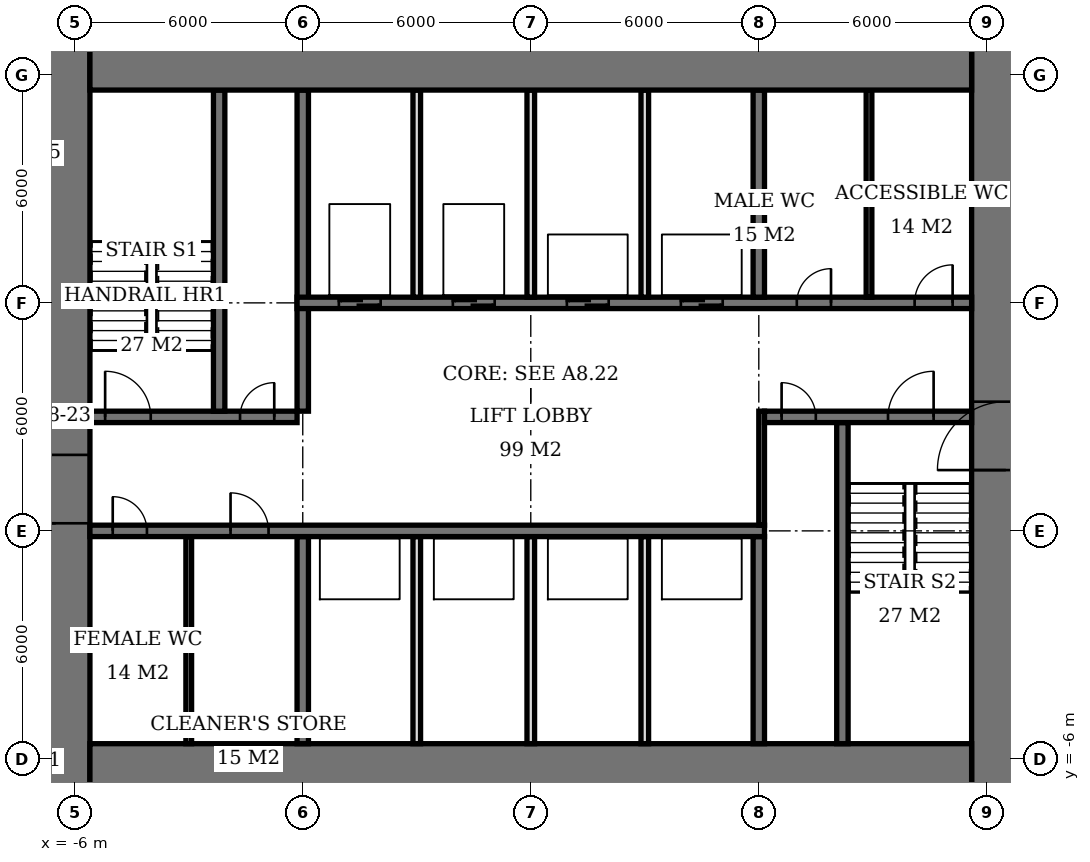
"""IFC4 building model, lengths in metres.
Left out: names, types, materials, properties, quantities, classifications, styles, units other than length and angle.
Written with IfcOpenShell. Run it as: python <this file> out.ifc"""

import sys

from ifc_helpers import new_model, si_unit, direction, frame, frame_2d, origin, place, context, subcontext, project, spatial, rectangle, extrude, element, fill, save


model = new_model("IFC4")
c1 = context("Model", 3, precision=1e-05, world=origin(), true_north=direction((0.0, 1.0)))
c2 = subcontext(c1, "Body", "Model", "MODEL_VIEW")
j1 = project(units=[si_unit("LENGTHUNIT", "METRE"), si_unit("PLANEANGLEUNIT", "RADIAN")], contexts=[c1])
p1 = place(None, origin())
s1 = spatial("IfcSite", under=j1, at=p1, CompositionType="ELEMENT")
p2 = place(p1, origin())
s2 = spatial("IfcBuilding", under=s1, at=p2, CompositionType="ELEMENT")
p3 = place(p2, frame((0.0, 0.0, 37.7)))
s3 = spatial("IfcBuildingStorey", under=s2, at=p3, CompositionType="ELEMENT", Elevation=37.7)
for number, where, z_axis, x_axis in (
    (1, (-5.6, -6.6, 0.0), (0.0, 0.0, 1.0), (1.0, 0.0, 0.0)),
    (2, (-5.6, 12.6, 0.0), (0.0, 0.0, 1.0), (1.0, 0.0, 0.0)),
):
    element("IfcWall", number, at=place(p3, frame(where, z_axis=z_axis, x_axis=x_axis)), inside=s3, PredefinedType="SHEAR", context=c2, shape_type="SweptSolid", body=[
        extrude(rectangle(XDim=23.2, YDim=2.0, at=frame_2d((11.6, 0.0))), origin(), (0.0, 0.0, 1.0), 3.9),
    ])
p4 = place(p3, frame((-6.5, -7.6, 0.0), z_axis=(0.0, 0.0, 1.0), x_axis=(0.0, 1.0, 0.0)))
e3 = element("IfcWall", 3, at=p4, inside=s3, PredefinedType="SHEAR", context=c2, shape_type="SweptSolid", body=[
    extrude(rectangle(XDim=21.2, YDim=1.8, at=frame_2d((10.6, 0.0))), origin(), (0.0, 0.0, 1.0), 3.9),
])
p5 = place(p4, frame((7.8, 0.0, 0.0)))
e4 = element("IfcOpeningElement", 4, at=p5, cuts=e3, PredefinedType="OPENING", context=c2, shape_type="SweptSolid", body=[
    extrude(rectangle(XDim=1.8, YDim=2.4, at=frame_2d((0.9, 1.2))), frame((0.0, 0.91, 0.0), z_axis=(0.0, -1.0, 0.0), x_axis=(1.0, 0.0, 0.0)), (0.0, 0.0, 1.0), 1.82),
])
p6 = place(p3, frame((18.5, -7.6, 0.0), z_axis=(0.0, 0.0, 1.0), x_axis=(0.0, 1.0, 0.0)))
e5 = element("IfcWall", 5, at=p6, inside=s3, PredefinedType="SHEAR", context=c2, shape_type="SweptSolid", body=[
    extrude(rectangle(XDim=21.2, YDim=1.8, at=frame_2d((10.6, 0.0))), origin(), (0.0, 0.0, 1.0), 3.9),
])
p7 = place(p6, frame((9.2, 0.0, 0.0)))
e6 = element("IfcOpeningElement", 6, at=p7, cuts=e5, PredefinedType="OPENING", context=c2, shape_type="SweptSolid", body=[
    extrude(rectangle(XDim=1.8, YDim=2.4, at=frame_2d((0.9, 1.2))), frame((0.0, 0.91, 0.0), z_axis=(0.0, -1.0, 0.0), x_axis=(1.0, 0.0, 0.0)), (0.0, 0.0, 1.0), 1.82),
])
p8 = place(p3, frame((-5.6, 0.0, 0.0), z_axis=(0.0, 0.0, 1.0), x_axis=(1.0, 0.0, 0.0)))
e7 = element("IfcWall", 7, at=p8, inside=s3, PredefinedType="SHEAR", context=c2, shape_type="SweptSolid", body=[
    extrude(rectangle(XDim=17.75, YDim=0.3, at=frame_2d((8.875, 0.0))), origin(), (0.0, 0.0, 1.0), 3.9),
])
p9 = place(p8, frame((0.6, 0.0, 0.0)))
e8 = element("IfcOpeningElement", 8, at=p9, cuts=e7, PredefinedType="OPENING", context=c2, shape_type="SweptSolid", body=[
    extrude(rectangle(XDim=0.9, YDim=2.1, at=frame_2d((0.45, 1.05))), frame((0.0, 0.16, 0.0), z_axis=(0.0, -1.0, 0.0), x_axis=(1.0, 0.0, 0.0)), (0.0, 0.0, 1.0), 0.32),
])
p10 = place(p8, frame((3.7, 0.0, 0.0)))
e9 = element("IfcOpeningElement", 9, at=p10, cuts=e7, PredefinedType="OPENING", context=c2, shape_type="SweptSolid", body=[
    extrude(rectangle(XDim=1.0, YDim=2.1, at=frame_2d((0.5, 1.05))), frame((0.0, 0.16, 0.0), z_axis=(0.0, -1.0, 0.0), x_axis=(1.0, 0.0, 0.0)), (0.0, 0.0, 1.0), 0.32),
])
p11 = place(p3, frame((-5.6, 3.0, 0.0), z_axis=(0.0, 0.0, 1.0), x_axis=(1.0, 0.0, 0.0)))
e10 = element("IfcWall", 10, at=p11, inside=s3, PredefinedType="SHEAR", context=c2, shape_type="SweptSolid", body=[
    extrude(rectangle(XDim=5.45, YDim=0.3, at=frame_2d((2.725, 0.0))), origin(), (0.0, 0.0, 1.0), 3.9),
])
p12 = place(p11, frame((0.4, 0.0, 0.0)))
e11 = element("IfcOpeningElement", 11, at=p12, cuts=e10, PredefinedType="OPENING", context=c2, shape_type="SweptSolid", body=[
    extrude(rectangle(XDim=1.2, YDim=2.1, at=frame_2d((0.6, 1.05))), frame((0.0, 0.16, 0.0), z_axis=(0.0, -1.0, 0.0), x_axis=(1.0, 0.0, 0.0)), (0.0, 0.0, 1.0), 0.32),
])
p13 = place(p11, frame((3.95, 0.0, 0.0)))
e12 = element("IfcOpeningElement", 12, at=p13, cuts=e10, PredefinedType="OPENING", context=c2, shape_type="SweptSolid", body=[
    extrude(rectangle(XDim=0.9, YDim=2.1, at=frame_2d((0.45, 1.05))), frame((0.0, 0.16, 0.0), z_axis=(0.0, -1.0, 0.0), x_axis=(1.0, 0.0, 0.0)), (0.0, 0.0, 1.0), 0.32),
])
p14 = place(p3, frame((12.15, 3.0, 0.0), z_axis=(0.0, 0.0, 1.0), x_axis=(1.0, 0.0, 0.0)))
e13 = element("IfcWall", 13, at=p14, inside=s3, PredefinedType="SHEAR", context=c2, shape_type="SweptSolid", body=[
    extrude(rectangle(XDim=5.45, YDim=0.3, at=frame_2d((2.725, 0.0))), origin(), (0.0, 0.0, 1.0), 3.9),
])
p15 = place(p14, frame((3.25, 0.0, 0.0)))
e14 = element("IfcOpeningElement", 14, at=p15, cuts=e13, PredefinedType="OPENING", context=c2, shape_type="SweptSolid", body=[
    extrude(rectangle(XDim=1.2, YDim=2.1, at=frame_2d((0.6, 1.05))), frame((0.0, 0.16, 0.0), z_axis=(0.0, -1.0, 0.0), x_axis=(1.0, 0.0, 0.0)), (0.0, 0.0, 1.0), 0.32),
])
p16 = place(p14, frame((0.45, 0.0, 0.0)))
e15 = element("IfcOpeningElement", 15, at=p16, cuts=e13, PredefinedType="OPENING", context=c2, shape_type="SweptSolid", body=[
    extrude(rectangle(XDim=0.9, YDim=2.1, at=frame_2d((0.45, 1.05))), frame((0.0, 0.16, 0.0), z_axis=(0.0, -1.0, 0.0), x_axis=(1.0, 0.0, 0.0)), (0.0, 0.0, 1.0), 0.32),
])
p17 = place(p3, frame((-0.15, 6.0, 0.0), z_axis=(0.0, 0.0, 1.0), x_axis=(1.0, 0.0, 0.0)))
e16 = element("IfcWall", 16, at=p17, inside=s3, PredefinedType="SHEAR", context=c2, shape_type="SweptSolid", body=[
    extrude(rectangle(XDim=17.75, YDim=0.3, at=frame_2d((8.875, 0.0))), origin(), (0.0, 0.0, 1.0), 3.9),
])
p18 = place(p17, frame((13.15, 0.0, 0.0)))
e17 = element("IfcOpeningElement", 17, at=p18, cuts=e16, PredefinedType="OPENING", context=c2, shape_type="SweptSolid", body=[
    extrude(rectangle(XDim=0.9, YDim=2.1, at=frame_2d((0.45, 1.05))), frame((0.0, 0.16, 0.0), z_axis=(0.0, -1.0, 0.0), x_axis=(1.0, 0.0, 0.0)), (0.0, 0.0, 1.0), 0.32),
])
p19 = place(p17, frame((16.25, 0.0, 0.0)))
e18 = element("IfcOpeningElement", 18, at=p19, cuts=e16, PredefinedType="OPENING", context=c2, shape_type="SweptSolid", body=[
    extrude(rectangle(XDim=1.0, YDim=2.1, at=frame_2d((0.5, 1.05))), frame((0.0, 0.16, 0.0), z_axis=(0.0, -1.0, 0.0), x_axis=(1.0, 0.0, 0.0)), (0.0, 0.0, 1.0), 0.32),
])
p20 = place(p17, frame((1.1, 0.0, 0.0)))
e19 = element("IfcOpeningElement", 19, at=p20, cuts=e16, PredefinedType="OPENING", context=c2, shape_type="SweptSolid", body=[
    extrude(rectangle(XDim=1.1, YDim=2.1, at=frame_2d((0.55, 1.05))), frame((0.0, 0.16, 0.0), z_axis=(0.0, -1.0, 0.0), x_axis=(1.0, 0.0, 0.0)), (0.0, 0.0, 1.0), 0.32),
])
p21 = place(p17, frame((4.1, 0.0, 0.0)))
e20 = element("IfcOpeningElement", 20, at=p21, cuts=e16, PredefinedType="OPENING", context=c2, shape_type="SweptSolid", body=[
    extrude(rectangle(XDim=1.1, YDim=2.1, at=frame_2d((0.55, 1.05))), frame((0.0, 0.16, 0.0), z_axis=(0.0, -1.0, 0.0), x_axis=(1.0, 0.0, 0.0)), (0.0, 0.0, 1.0), 0.32),
])
p22 = place(p17, frame((7.1, 0.0, 0.0)))
e21 = element("IfcOpeningElement", 21, at=p22, cuts=e16, PredefinedType="OPENING", context=c2, shape_type="SweptSolid", body=[
    extrude(rectangle(XDim=1.1, YDim=2.1, at=frame_2d((0.55, 1.05))), frame((0.0, 0.16, 0.0), z_axis=(0.0, -1.0, 0.0), x_axis=(1.0, 0.0, 0.0)), (0.0, 0.0, 1.0), 0.32),
])
p23 = place(p17, frame((10.1, 0.0, 0.0)))
e22 = element("IfcOpeningElement", 22, at=p23, cuts=e16, PredefinedType="OPENING", context=c2, shape_type="SweptSolid", body=[
    extrude(rectangle(XDim=1.1, YDim=2.1, at=frame_2d((0.55, 1.05))), frame((0.0, 0.16, 0.0), z_axis=(0.0, -1.0, 0.0), x_axis=(1.0, 0.0, 0.0)), (0.0, 0.0, 1.0), 0.32),
])
p24 = place(p3, frame((0.0, -5.6, 0.0), z_axis=(0.0, 0.0, 1.0), x_axis=(0.0, 1.0, 0.0)))
e23 = element("IfcWall", 23, at=p24, inside=s3, PredefinedType="SHEAR", context=c2, shape_type="SweptSolid", body=[
    extrude(rectangle(XDim=5.45, YDim=0.3, at=frame_2d((2.725, 0.0))), origin(), (0.0, 0.0, 1.0), 3.9),
])
p25 = place(p3, frame((0.0, 3.15, 0.0), z_axis=(0.0, 0.0, 1.0), x_axis=(0.0, 1.0, 0.0)))
e24 = element("IfcWall", 24, at=p25, inside=s3, PredefinedType="SHEAR", context=c2, shape_type="SweptSolid", body=[
    extrude(rectangle(XDim=8.45, YDim=0.3, at=frame_2d((4.225, 0.0))), origin(), (0.0, 0.0, 1.0), 3.9),
])
for number, where, z_axis, x_axis in (
    (25, (12.0, -5.6, 0.0), (0.0, 0.0, 1.0), (0.0, 1.0, 0.0)),
    (26, (12.0, 6.15, 0.0), (0.0, 0.0, 1.0), (0.0, 1.0, 0.0)),
):
    element("IfcWall", number, at=place(p3, frame(where, z_axis=z_axis, x_axis=x_axis)), inside=s3, PredefinedType="SHEAR", context=c2, shape_type="SweptSolid", body=[
        extrude(rectangle(XDim=5.45, YDim=0.3, at=frame_2d((2.725, 0.0))), origin(), (0.0, 0.0, 1.0), 3.9),
    ])
for number, where, z_axis, x_axis in (
    (27, (-2.2, 3.15, 0.0), (0.0, 0.0, 1.0), (0.0, 1.0, 0.0)),
    (28, (14.2, -5.6, 0.0), (0.0, 0.0, 1.0), (0.0, 1.0, 0.0)),
):
    element("IfcWall", number, at=place(p3, frame(where, z_axis=z_axis, x_axis=x_axis)), inside=s3, PredefinedType="SHEAR", context=c2, shape_type="SweptSolid", body=[
        extrude(rectangle(XDim=8.45, YDim=0.3, at=frame_2d((4.225, 0.0))), origin(), (0.0, 0.0, 1.0), 3.9),
    ])
for number, where, z_axis, x_axis in (
    (29, (3.0, 6.15, 0.0), (0.0, 0.0, 1.0), (0.0, 1.0, 0.0)),
    (30, (6.0, 6.15, 0.0), (0.0, 0.0, 1.0), (0.0, 1.0, 0.0)),
    (31, (9.0, 6.15, 0.0), (0.0, 0.0, 1.0), (0.0, 1.0, 0.0)),
    (32, (3.0, -5.6, 0.0), (0.0, 0.0, 1.0), (0.0, 1.0, 0.0)),
    (33, (6.0, -5.6, 0.0), (0.0, 0.0, 1.0), (0.0, 1.0, 0.0)),
    (34, (9.0, -5.6, 0.0), (0.0, 0.0, 1.0), (0.0, 1.0, 0.0)),
):
    element("IfcWall", number, at=place(p3, frame(where, z_axis=z_axis, x_axis=x_axis)), inside=s3, PredefinedType="SOLIDWALL", context=c2, shape_type="SweptSolid", body=[
        extrude(rectangle(XDim=5.45, YDim=0.2, at=frame_2d((2.725, 0.0))), origin(), (0.0, 0.0, 1.0), 3.9),
    ])
for number, where, z_axis, x_axis in (
    (35, (-3.0, -5.6, 0.0), (0.0, 0.0, 1.0), (0.0, 1.0, 0.0)),
    (36, (14.9, 6.15, 0.0), (0.0, 0.0, 1.0), (0.0, 1.0, 0.0)),
):
    element("IfcWall", number, at=place(p3, frame(where, z_axis=z_axis, x_axis=x_axis)), inside=s3, PredefinedType="PLUMBINGWALL", context=c2, shape_type="SweptSolid", body=[
        extrude(rectangle(XDim=5.45, YDim=0.15, at=frame_2d((2.725, 0.0))), origin(), (0.0, 0.0, 1.0), 3.65),
    ])
p26 = place(p3, frame((12.075, 0.15, 0.0), z_axis=(0.0, 0.0, 1.0), x_axis=(0.0, 1.0, 0.0)))
e37 = element("IfcWall", 37, at=p26, inside=s3, PredefinedType="PARTITIONING", context=c2, shape_type="SweptSolid", body=[
    extrude(rectangle(XDim=3.0, YDim=0.15, at=frame_2d((1.5, 0.0))), origin(), (0.0, 0.0, 1.0), 3.65),
])
p27 = place(p5, origin())
e38 = element("IfcDoor", 38, at=p27, inside=s3, OperationType="DOUBLE_DOOR_SINGLE_SWING", PredefinedType="DOOR", context=c2, shape_type="SweptSolid", body=[
    extrude(rectangle(XDim=1.8, YDim=2.4, at=frame_2d((0.9, 1.2))), frame((0.0, 0.025, 0.0), z_axis=(0.0, -1.0, 0.0), x_axis=(1.0, 0.0, 0.0)), (0.0, 0.0, 1.0), 0.05),
])
fill(e4, e38)
p28 = place(p7, origin())
e39 = element("IfcDoor", 39, at=p28, inside=s3, OperationType="DOUBLE_DOOR_SINGLE_SWING", PredefinedType="DOOR", context=c2, shape_type="SweptSolid", body=[
    extrude(rectangle(XDim=1.8, YDim=2.4, at=frame_2d((0.9, 1.2))), frame((0.0, 0.025, 0.0), z_axis=(0.0, -1.0, 0.0), x_axis=(1.0, 0.0, 0.0)), (0.0, 0.0, 1.0), 0.05),
])
fill(e6, e39)
p29 = place(p12, origin())
e40 = element("IfcDoor", 40, at=p29, inside=s3, OperationType="SINGLE_SWING_LEFT", PredefinedType="DOOR", context=c2, shape_type="SweptSolid", body=[
    extrude(rectangle(XDim=1.2, YDim=2.1, at=frame_2d((0.6, 1.05))), frame((0.0, 0.025, 0.0), z_axis=(0.0, -1.0, 0.0), x_axis=(1.0, 0.0, 0.0)), (0.0, 0.0, 1.0), 0.05),
])
fill(e11, e40)
p30 = place(p13, origin())
e41 = element("IfcDoor", 41, at=p30, inside=s3, OperationType="SINGLE_SWING_RIGHT", PredefinedType="DOOR", context=c2, shape_type="SweptSolid", body=[
    extrude(rectangle(XDim=0.9, YDim=2.1, at=frame_2d((0.45, 1.05))), frame((0.0, 0.025, 0.0), z_axis=(0.0, -1.0, 0.0), x_axis=(1.0, 0.0, 0.0)), (0.0, 0.0, 1.0), 0.05),
])
fill(e12, e41)
p31 = place(p15, origin())
e42 = element("IfcDoor", 42, at=p31, inside=s3, OperationType="SINGLE_SWING_RIGHT", PredefinedType="DOOR", context=c2, shape_type="SweptSolid", body=[
    extrude(rectangle(XDim=1.2, YDim=2.1, at=frame_2d((0.6, 1.05))), frame((0.0, 0.025, 0.0), z_axis=(0.0, -1.0, 0.0), x_axis=(1.0, 0.0, 0.0)), (0.0, 0.0, 1.0), 0.05),
])
fill(e14, e42)
p32 = place(p16, origin())
e43 = element("IfcDoor", 43, at=p32, inside=s3, OperationType="SINGLE_SWING_LEFT", PredefinedType="DOOR", context=c2, shape_type="SweptSolid", body=[
    extrude(rectangle(XDim=0.9, YDim=2.1, at=frame_2d((0.45, 1.05))), frame((0.0, 0.025, 0.0), z_axis=(0.0, -1.0, 0.0), x_axis=(1.0, 0.0, 0.0)), (0.0, 0.0, 1.0), 0.05),
])
fill(e15, e43)
p33 = place(p9, origin())
e44 = element("IfcDoor", 44, at=p33, inside=s3, OperationType="SINGLE_SWING_LEFT", PredefinedType="DOOR", context=c2, shape_type="SweptSolid", body=[
    extrude(rectangle(XDim=0.9, YDim=2.1, at=frame_2d((0.45, 1.05))), frame((0.0, 0.025, 0.0), z_axis=(0.0, -1.0, 0.0), x_axis=(1.0, 0.0, 0.0)), (0.0, 0.0, 1.0), 0.05),
])
fill(e8, e44)
p34 = place(p10, origin())
e45 = element("IfcDoor", 45, at=p34, inside=s3, OperationType="SINGLE_SWING_LEFT", PredefinedType="DOOR", context=c2, shape_type="SweptSolid", body=[
    extrude(rectangle(XDim=1.0, YDim=2.1, at=frame_2d((0.5, 1.05))), frame((0.0, 0.025, 0.0), z_axis=(0.0, -1.0, 0.0), x_axis=(1.0, 0.0, 0.0)), (0.0, 0.0, 1.0), 0.05),
])
fill(e9, e45)
p35 = place(p18, origin())
e46 = element("IfcDoor", 46, at=p35, inside=s3, OperationType="SINGLE_SWING_RIGHT", PredefinedType="DOOR", context=c2, shape_type="SweptSolid", body=[
    extrude(rectangle(XDim=0.9, YDim=2.1, at=frame_2d((0.45, 1.05))), frame((0.0, 0.025, 0.0), z_axis=(0.0, -1.0, 0.0), x_axis=(1.0, 0.0, 0.0)), (0.0, 0.0, 1.0), 0.05),
])
fill(e17, e46)
p36 = place(p19, origin())
e47 = element("IfcDoor", 47, at=p36, inside=s3, OperationType="SINGLE_SWING_RIGHT", PredefinedType="DOOR", context=c2, shape_type="SweptSolid", body=[
    extrude(rectangle(XDim=1.0, YDim=2.1, at=frame_2d((0.5, 1.05))), frame((0.0, 0.025, 0.0), z_axis=(0.0, -1.0, 0.0), x_axis=(1.0, 0.0, 0.0)), (0.0, 0.0, 1.0), 0.05),
])
fill(e18, e47)
p37 = place(p20, origin())
e48 = element("IfcDoor", 48, at=p37, inside=s3, OperationType="DOUBLE_DOOR_SLIDING", PredefinedType="USERDEFINED", context=c2, shape_type="SweptSolid", body=[
    extrude(rectangle(XDim=1.1, YDim=2.1, at=frame_2d((0.55, 1.05))), frame((0.0, 0.025, 0.0), z_axis=(0.0, -1.0, 0.0), x_axis=(1.0, 0.0, 0.0)), (0.0, 0.0, 1.0), 0.05),
])
fill(e19, e48)
p38 = place(p21, origin())
e49 = element("IfcDoor", 49, at=p38, inside=s3, OperationType="DOUBLE_DOOR_SLIDING", PredefinedType="USERDEFINED", context=c2, shape_type="SweptSolid", body=[
    extrude(rectangle(XDim=1.1, YDim=2.1, at=frame_2d((0.55, 1.05))), frame((0.0, 0.025, 0.0), z_axis=(0.0, -1.0, 0.0), x_axis=(1.0, 0.0, 0.0)), (0.0, 0.0, 1.0), 0.05),
])
fill(e20, e49)
p39 = place(p22, origin())
e50 = element("IfcDoor", 50, at=p39, inside=s3, OperationType="DOUBLE_DOOR_SLIDING", PredefinedType="USERDEFINED", context=c2, shape_type="SweptSolid", body=[
    extrude(rectangle(XDim=1.1, YDim=2.1, at=frame_2d((0.55, 1.05))), frame((0.0, 0.025, 0.0), z_axis=(0.0, -1.0, 0.0), x_axis=(1.0, 0.0, 0.0)), (0.0, 0.0, 1.0), 0.05),
])
fill(e21, e50)
p40 = place(p23, origin())
e51 = element("IfcDoor", 51, at=p40, inside=s3, OperationType="DOUBLE_DOOR_SLIDING", PredefinedType="USERDEFINED", context=c2, shape_type="SweptSolid", body=[
    extrude(rectangle(XDim=1.1, YDim=2.1, at=frame_2d((0.55, 1.05))), frame((0.0, 0.025, 0.0), z_axis=(0.0, -1.0, 0.0), x_axis=(1.0, 0.0, 0.0)), (0.0, 0.0, 1.0), 0.05),
])
fill(e22, e51)
save(model, sys.argv[1])
